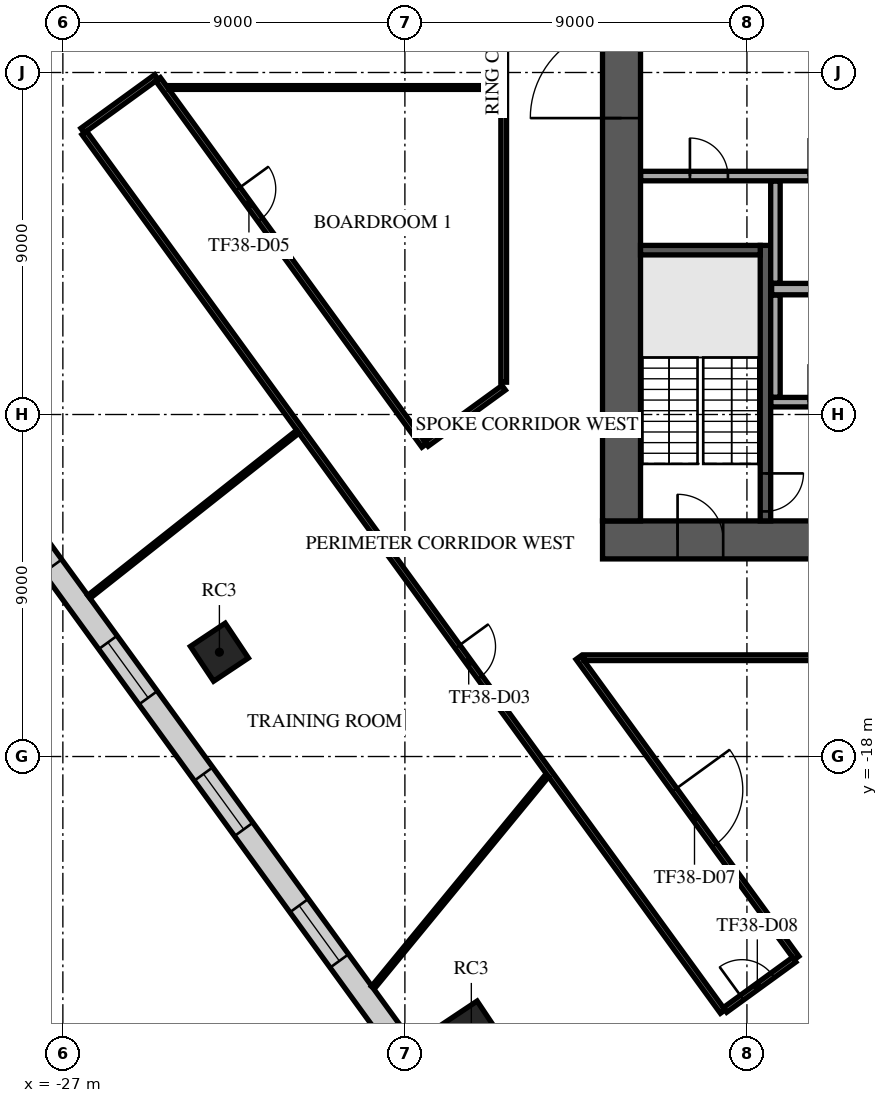
"""IFC4 building model, lengths in metres.
Left out: names, types, materials, properties, quantities, classifications, styles, units other than length and angle.
Written with IfcOpenShell. Run it as: python <this file> out.ifc"""

import sys

from ifc_helpers import new_model, si_unit, direction, frame, frame_2d, origin, origin_2d, place, context, subcontext, project, spatial, rectangle, extrude, element, fill, save


model = new_model("IFC4")
c1 = context("Model", 3, precision=1e-05, world=origin(), true_north=direction((0.0, 1.0)))
c2 = subcontext(c1, "Body", "Model", "MODEL_VIEW")
j1 = project(units=[si_unit("LENGTHUNIT", "METRE"), si_unit("PLANEANGLEUNIT", "RADIAN")], contexts=[c1])
p1 = place(None, origin())
s1 = spatial("IfcSite", under=j1, at=p1, CompositionType="ELEMENT")
p2 = place(p1, origin())
s2 = spatial("IfcBuilding", under=s1, at=p2, CompositionType="ELEMENT")
p3 = place(p2, frame((0.0, 0.0, 163.7)))
s3 = spatial("IfcBuildingStorey", under=s2, at=p3, CompositionType="ELEMENT", Elevation=163.7)
for number, where, z_axis, x_axis in (
    (1, (-22.881, -15.255, 0.0), (0.0, 0.0, 1.0), (0.832, 0.555, 0.0)),
    (2, (-16.252, -25.198, 0.0), (0.0, 0.0, 1.0), (0.832, 0.555, 0.0)),
):
    element("IfcColumn", number, at=place(p3, frame(where, z_axis=z_axis, x_axis=x_axis)), inside=s3, PredefinedType="COLUMN", context=c2, shape_type="SweptSolid", body=[
        extrude(rectangle(XDim=1.1, YDim=1.1, at=origin_2d()), origin(), (0.0, 0.0, 1.0), 4.0),
    ])
p4 = place(p3, frame((-12.8, -12.3, 0.0), z_axis=(0.0, 0.0, 1.0), x_axis=(1.0, 0.0, 0.0)))
e3 = element("IfcWall", 3, at=p4, inside=s3, PredefinedType="SHEAR", context=c2, shape_type="SweptSolid", body=[
    extrude(rectangle(XDim=25.6, YDim=1.0, at=frame_2d((12.8, 0.0))), origin(), (0.0, 0.0, 1.0), 3.6),
])
p5 = place(p4, frame((7.7, 0.0, 0.0)))
e4 = element("IfcOpeningElement", 4, at=p5, cuts=e3, PredefinedType="OPENING", context=c2, shape_type="SweptSolid", body=[
    extrude(rectangle(XDim=2.0, YDim=2.1, at=frame_2d((1.0, 1.05))), frame((0.0, 0.51, 0.0), z_axis=(0.0, -1.0, 0.0), x_axis=(1.0, 0.0, 0.0)), (0.0, 0.0, 1.0), 1.02),
])
p6 = place(p4, frame((17.825, 0.0, 0.0)))
e5 = element("IfcOpeningElement", 5, at=p6, cuts=e3, PredefinedType="OPENING", context=c2, shape_type="SweptSolid", body=[
    extrude(rectangle(XDim=1.2, YDim=2.1, at=frame_2d((0.6, 1.05))), frame((0.0, 0.51, 0.0), z_axis=(0.0, -1.0, 0.0), x_axis=(1.0, 0.0, 0.0)), (0.0, 0.0, 1.0), 1.02),
])
p7 = place(p4, frame((1.975, 0.0, 0.0)))
e6 = element("IfcOpeningElement", 6, at=p7, cuts=e3, PredefinedType="OPENING", context=c2, shape_type="SweptSolid", body=[
    extrude(rectangle(XDim=1.2, YDim=2.1, at=frame_2d((0.6, 1.05))), frame((0.0, 0.51, 0.0), z_axis=(0.0, -1.0, 0.0), x_axis=(1.0, 0.0, 0.0)), (0.0, 0.0, 1.0), 1.02),
])
p8 = place(p4, frame((22.425, 0.0, 0.0)))
e7 = element("IfcOpeningElement", 7, at=p8, cuts=e3, PredefinedType="OPENING", context=c2, shape_type="SweptSolid", body=[
    extrude(rectangle(XDim=1.2, YDim=2.1, at=frame_2d((0.6, 1.05))), frame((0.0, 0.51, 0.0), z_axis=(0.0, -1.0, 0.0), x_axis=(1.0, 0.0, 0.0)), (0.0, 0.0, 1.0), 1.02),
])
p9 = place(p3, frame((-12.3, -11.8, 0.0), z_axis=(0.0, 0.0, 1.0), x_axis=(0.0, 1.0, 0.0)))
e8 = element("IfcWall", 8, at=p9, inside=s3, PredefinedType="SHEAR", context=c2, shape_type="SweptSolid", body=[
    extrude(rectangle(XDim=23.6, YDim=1.0, at=frame_2d((11.8, 0.0))), origin(), (0.0, 0.0, 1.0), 3.6),
])
p10 = place(p9, frame((10.6, 0.0, 0.0)))
e9 = element("IfcOpeningElement", 9, at=p10, cuts=e8, PredefinedType="OPENING", context=c2, shape_type="SweptSolid", body=[
    extrude(rectangle(XDim=2.4, YDim=2.4, at=frame_2d((1.2, 1.2))), frame((0.0, 0.51, 0.0), z_axis=(0.0, -1.0, 0.0), x_axis=(1.0, 0.0, 0.0)), (0.0, 0.0, 1.0), 1.02),
])
p11 = place(p3, frame((-8.512, -4.55, 0.0), z_axis=(0.0, 0.0, 1.0), x_axis=(0.0, -1.0, 0.0)))
e10 = element("IfcWall", 10, at=p11, inside=s3, PredefinedType="SOLIDWALL", context=c2, shape_type="SweptSolid", body=[
    extrude(rectangle(XDim=7.25, YDim=0.275, at=frame_2d((3.625, 0.0))), origin(), (0.0, 0.0, 1.0), 3.6),
])
p12 = place(p11, frame((6.0, 0.0, 0.0)))
e11 = element("IfcOpeningElement", 11, at=p12, cuts=e10, PredefinedType="OPENING", context=c2, shape_type="SweptSolid", body=[
    extrude(rectangle(XDim=1.0, YDim=2.1, at=frame_2d((0.5, 1.05))), frame((0.0, 0.147, 0.0), z_axis=(0.0, -1.0, 0.0), x_axis=(1.0, 0.0, 0.0)), (0.0, 0.0, 1.0), 0.295),
])
p13 = place(p3, frame((-8.65, -4.675, 0.0), z_axis=(0.0, 0.0, 1.0), x_axis=(-1.0, 0.0, 0.0)))
e12 = element("IfcWall", 12, at=p13, inside=s3, PredefinedType="SOLIDWALL", context=c2, shape_type="SweptSolid", body=[
    extrude(rectangle(XDim=3.15, YDim=0.25, at=frame_2d((1.575, 0.0))), origin(), (0.0, 0.0, 1.0), 3.6),
])
p14 = place(p3, frame((-8.37, -8.675, 0.0), z_axis=(0.0, 0.0, 1.0), x_axis=(1.0, 0.0, 0.0)))
e13 = element("IfcWall", 13, at=p14, inside=s3, PredefinedType="PARTITIONING", context=c2, shape_type="SweptSolid", body=[
    extrude(rectangle(XDim=5.49, YDim=0.25, at=frame_2d((2.745, 0.0))), origin(), (0.0, 0.0, 1.0), 3.6),
])
p15 = place(p14, frame((0.995, 0.0, 0.0)))
e14 = element("IfcOpeningElement", 14, at=p15, cuts=e13, PredefinedType="OPENING", context=c2, shape_type="SweptSolid", body=[
    extrude(rectangle(XDim=1.0, YDim=2.1, at=frame_2d((0.5, 1.05))), frame((0.0, 0.135, 0.0), z_axis=(0.0, -1.0, 0.0), x_axis=(1.0, 0.0, 0.0)), (0.0, 0.0, 1.0), 0.27),
])
p16 = place(p14, frame((3.745, 0.0, 0.0)))
e15 = element("IfcOpeningElement", 15, at=p16, cuts=e13, PredefinedType="OPENING", context=c2, shape_type="SweptSolid", body=[
    extrude(rectangle(XDim=1.0, YDim=2.1, at=frame_2d((0.5, 1.05))), frame((0.0, 0.135, 0.0), z_axis=(0.0, -1.0, 0.0), x_axis=(1.0, 0.0, 0.0)), (0.0, 0.0, 1.0), 0.27),
])
p17 = place(p3, frame((-8.25, -8.545, 0.0), z_axis=(0.0, 0.0, 1.0), x_axis=(0.0, 1.0, 0.0)))
e16 = element("IfcWall", 16, at=p17, inside=s3, PredefinedType="PARTITIONING", context=c2, shape_type="SweptSolid", body=[
    extrude(rectangle(XDim=2.69, YDim=0.25, at=frame_2d((1.345, 0.0))), origin(), (0.0, 0.0, 1.0), 3.6),
])
p18 = place(p3, frame((-8.35, -5.7, 0.0), z_axis=(0.0, 0.0, 1.0), x_axis=(1.0, 0.0, 0.0)))
e17 = element("IfcWall", 17, at=p18, inside=s3, PredefinedType="PARTITIONING", context=c2, shape_type="SweptSolid", body=[
    extrude(rectangle(XDim=5.47, YDim=0.3, at=frame_2d((2.735, 0.0))), origin(), (0.0, 0.0, 1.0), 3.6),
])
p19 = place(p3, frame((-8.25, -5.545, 0.0), z_axis=(0.0, 0.0, 1.0), x_axis=(0.0, 1.0, 0.0)))
e18 = element("IfcWall", 18, at=p19, inside=s3, PredefinedType="PARTITIONING", context=c2, shape_type="SweptSolid", body=[
    extrude(rectangle(XDim=2.69, YDim=0.25, at=frame_2d((1.345, 0.0))), origin(), (0.0, 0.0, 1.0), 3.6),
])
p20 = place(p3, frame((-11.795, -2.725, 0.0), z_axis=(0.0, 0.0, 1.0), x_axis=(1.0, 0.0, 0.0)))
e19 = element("IfcWall", 19, at=p20, inside=s3, PredefinedType="PARTITIONING", context=c2, shape_type="SweptSolid", body=[
    extrude(rectangle(XDim=8.915, YDim=0.25, at=frame_2d((4.458, 0.0))), origin(), (0.0, 0.0, 1.0), 3.6),
])
p21 = place(p20, frame((1.295, 0.0, 0.0)))
e20 = element("IfcOpeningElement", 20, at=p21, cuts=e19, PredefinedType="OPENING", context=c2, shape_type="SweptSolid", body=[
    extrude(rectangle(XDim=1.0, YDim=2.1, at=frame_2d((0.5, 1.05))), frame((0.0, 0.135, 0.0), z_axis=(0.0, -1.0, 0.0), x_axis=(1.0, 0.0, 0.0)), (0.0, 0.0, 1.0), 0.27),
])
p22 = place(p20, frame((4.42, 0.0, 0.0)))
e21 = element("IfcOpeningElement", 21, at=p22, cuts=e19, PredefinedType="OPENING", context=c2, shape_type="SweptSolid", body=[
    extrude(rectangle(XDim=1.0, YDim=2.1, at=frame_2d((0.5, 1.05))), frame((0.0, 0.135, 0.0), z_axis=(0.0, -1.0, 0.0), x_axis=(1.0, 0.0, 0.0)), (0.0, 0.0, 1.0), 0.27),
])
p23 = place(p3, frame((-36.533, -0.245, 0.0), z_axis=(0.0, 0.0, 1.0), x_axis=(0.587787495615, -0.809015364501, 0.0)))
e22 = element("IfcWall", 22, at=p23, inside=s3, PredefinedType="STANDARD", context=c2, shape_type="SweptSolid", body=[
    extrude(rectangle(XDim=42.552, YDim=0.6, at=frame_2d((21.276, 0.0))), origin(), (0.0, 0.0, 1.0), 3.6),
])
p24 = place(p23, frame((1.178, 0.0, 0.9)))
e23 = element("IfcOpeningElement", 23, at=p24, cuts=e22, PredefinedType="OPENING", context=c2, shape_type="SweptSolid", body=[
    extrude(rectangle(XDim=1.8, YDim=2.1, at=frame_2d((0.9, 1.05))), frame((0.0, 0.31, 0.0), z_axis=(0.0, -1.0, 0.0), x_axis=(1.0, 0.0, 0.0)), (0.0, 0.0, 1.0), 0.62),
])
p25 = place(p23, frame((5.396, 0.0, 0.9)))
e24 = element("IfcOpeningElement", 24, at=p25, cuts=e22, PredefinedType="OPENING", context=c2, shape_type="SweptSolid", body=[
    extrude(rectangle(XDim=1.8, YDim=2.1, at=frame_2d((0.9, 1.05))), frame((0.0, 0.31, 0.0), z_axis=(0.0, -1.0, 0.0), x_axis=(1.0, 0.0, 0.0)), (0.0, 0.0, 1.0), 0.62),
])
p26 = place(p23, frame((9.676, 0.0, 0.9)))
e25 = element("IfcOpeningElement", 25, at=p26, cuts=e22, PredefinedType="OPENING", context=c2, shape_type="SweptSolid", body=[
    extrude(rectangle(XDim=1.8, YDim=2.1, at=frame_2d((0.9, 1.05))), frame((0.0, 0.31, 0.0), z_axis=(0.0, -1.0, 0.0), x_axis=(1.0, 0.0, 0.0)), (0.0, 0.0, 1.0), 0.62),
])
p27 = place(p23, frame((13.956, 0.0, 0.9)))
e26 = element("IfcOpeningElement", 26, at=p27, cuts=e22, PredefinedType="OPENING", context=c2, shape_type="SweptSolid", body=[
    extrude(rectangle(XDim=1.8, YDim=2.1, at=frame_2d((0.9, 1.05))), frame((0.0, 0.31, 0.0), z_axis=(0.0, -1.0, 0.0), x_axis=(1.0, 0.0, 0.0)), (0.0, 0.0, 1.0), 0.62),
])
p28 = place(p23, frame((18.236, 0.0, 0.9)))
e27 = element("IfcOpeningElement", 27, at=p28, cuts=e22, PredefinedType="OPENING", context=c2, shape_type="SweptSolid", body=[
    extrude(rectangle(XDim=1.8, YDim=2.1, at=frame_2d((0.9, 1.05))), frame((0.0, 0.31, 0.0), z_axis=(0.0, -1.0, 0.0), x_axis=(1.0, 0.0, 0.0)), (0.0, 0.0, 1.0), 0.62),
])
p29 = place(p23, frame((22.516, 0.0, 0.9)))
e28 = element("IfcOpeningElement", 28, at=p29, cuts=e22, PredefinedType="OPENING", context=c2, shape_type="SweptSolid", body=[
    extrude(rectangle(XDim=1.8, YDim=2.1, at=frame_2d((0.9, 1.05))), frame((0.0, 0.31, 0.0), z_axis=(0.0, -1.0, 0.0), x_axis=(1.0, 0.0, 0.0)), (0.0, 0.0, 1.0), 0.62),
])
p30 = place(p23, frame((26.796, 0.0, 0.9)))
e29 = element("IfcOpeningElement", 29, at=p30, cuts=e22, PredefinedType="OPENING", context=c2, shape_type="SweptSolid", body=[
    extrude(rectangle(XDim=1.8, YDim=2.1, at=frame_2d((0.9, 1.05))), frame((0.0, 0.31, 0.0), z_axis=(0.0, -1.0, 0.0), x_axis=(1.0, 0.0, 0.0)), (0.0, 0.0, 1.0), 0.62),
])
p31 = place(p23, frame((31.076, 0.0, 0.9)))
e30 = element("IfcOpeningElement", 30, at=p31, cuts=e22, PredefinedType="OPENING", context=c2, shape_type="SweptSolid", body=[
    extrude(rectangle(XDim=1.8, YDim=2.1, at=frame_2d((0.9, 1.05))), frame((0.0, 0.31, 0.0), z_axis=(0.0, -1.0, 0.0), x_axis=(1.0, 0.0, 0.0)), (0.0, 0.0, 1.0), 0.62),
])
p32 = place(p23, frame((35.356, 0.0, 0.9)))
e31 = element("IfcOpeningElement", 31, at=p32, cuts=e22, PredefinedType="OPENING", context=c2, shape_type="SweptSolid", body=[
    extrude(rectangle(XDim=1.8, YDim=2.1, at=frame_2d((0.9, 1.05))), frame((0.0, 0.31, 0.0), z_axis=(0.0, -1.0, 0.0), x_axis=(1.0, 0.0, 0.0)), (0.0, 0.0, 1.0), 0.62),
])
p33 = place(p23, frame((39.573, 0.0, 0.9)))
e32 = element("IfcOpeningElement", 32, at=p33, cuts=e22, PredefinedType="OPENING", context=c2, shape_type="SweptSolid", body=[
    extrude(rectangle(XDim=1.8, YDim=2.1, at=frame_2d((0.9, 1.05))), frame((0.0, 0.31, 0.0), z_axis=(0.0, -1.0, 0.0), x_axis=(1.0, 0.0, 0.0)), (0.0, 0.0, 1.0), 0.62),
])
p34 = place(p3, frame((-26.481, -1.528, 0.0), z_axis=(0.0, 0.0, 1.0), x_axis=(0.809158191643, 0.587590861822, 0.0)))
e33 = element("IfcWall", 33, at=p34, inside=s3, PredefinedType="PARTITIONING", context=c2, shape_type="SweptSolid", body=[
    extrude(rectangle(XDim=2.4, YDim=0.15, at=frame_2d((1.2, 0.0))), origin(), (0.0, 0.0, 1.0), 3.15),
])
p35 = place(p3, frame((-26.437, -1.589, 0.0), z_axis=(0.0, 0.0, 1.0), x_axis=(0.587768879666, -0.809028889531, 0.0)))
e34 = element("IfcWall", 34, at=p35, inside=s3, PredefinedType="PARTITIONING", context=c2, shape_type="SweptSolid", body=[
    extrude(rectangle(XDim=28.583, YDim=0.15, at=frame_2d((14.292, 0.0))), origin(), (0.0, 0.0, 1.0), 3.15),
])
p36 = place(p35, frame((16.711, 0.0, 0.0)))
e35 = element("IfcOpeningElement", 35, at=p36, cuts=e34, PredefinedType="OPENING", context=c2, shape_type="SweptSolid", body=[
    extrude(rectangle(XDim=1.0, YDim=2.1, at=frame_2d((0.5, 1.05))), frame((0.0, 0.085, 0.0), z_axis=(0.0, -1.0, 0.0), x_axis=(1.0, 0.0, 0.0)), (0.0, 0.0, 1.0), 0.17),
])
p37 = place(p3, frame((-24.495, -0.179, 0.0), z_axis=(0.0, 0.0, 1.0), x_axis=(0.587806096184, -0.809001849991, 0.0)))
e36 = element("IfcWall", 36, at=p37, inside=s3, PredefinedType="PARTITIONING", context=c2, shape_type="SweptSolid", body=[
    extrude(rectangle(XDim=11.914, YDim=0.15, at=frame_2d((5.957, 0.0))), origin(), (0.0, 0.0, 1.0), 3.15),
])
p38 = place(p37, frame((3.568, 0.0, 0.0)))
e37 = element("IfcOpeningElement", 37, at=p38, cuts=e36, PredefinedType="OPENING", context=c2, shape_type="SweptSolid", body=[
    extrude(rectangle(XDim=1.0, YDim=2.1, at=frame_2d((0.5, 1.05))), frame((0.0, 0.085, 0.0), z_axis=(0.0, -1.0, 0.0), x_axis=(1.0, 0.0, 0.0)), (0.0, 0.0, 1.0), 0.17),
])
p39 = place(p3, frame((-17.431, -9.773, 0.0), z_axis=(0.0, 0.0, 1.0), x_axis=(0.809042902641, 0.587749590971, 0.0)))
e38 = element("IfcWall", 38, at=p39, inside=s3, PredefinedType="PARTITIONING", context=c2, shape_type="SweptSolid", body=[
    extrude(rectangle(XDim=2.511, YDim=0.15, at=frame_2d((1.255, 0.0))), origin(), (0.0, 0.0, 1.0), 3.15),
])
p40 = place(p3, frame((-15.4, -8.15, 0.0), z_axis=(0.0, 0.0, 1.0), x_axis=(0.0, 1.0, 0.0)))
e39 = element("IfcWall", 39, at=p40, inside=s3, PredefinedType="PARTITIONING", context=c2, shape_type="SweptSolid", body=[
    extrude(rectangle(XDim=17.754, YDim=0.15, at=frame_2d((8.877, 0.0))), origin(), (0.0, 0.0, 1.0), 3.15),
])
p41 = place(p40, frame((13.304, 0.0, 0.0)))
e40 = element("IfcOpeningElement", 40, at=p41, cuts=e39, PredefinedType="OPENING", context=c2, shape_type="SweptSolid", body=[
    extrude(rectangle(XDim=1.8, YDim=2.1, at=frame_2d((0.9, 1.05))), frame((0.0, 0.085, 0.0), z_axis=(0.0, -1.0, 0.0), x_axis=(1.0, 0.0, 0.0)), (0.0, 0.0, 1.0), 0.17),
])
p42 = place(p3, frame((-13.436, -15.4, 0.0), z_axis=(0.0, 0.0, 1.0), x_axis=(0.58776885963, -0.809028904088, 0.0)))
e41 = element("IfcWall", 41, at=p42, inside=s3, PredefinedType="PARTITIONING", context=c2, shape_type="SweptSolid", body=[
    extrude(rectangle(XDim=9.767, YDim=0.15, at=frame_2d((4.884, 0.0))), origin(), (0.0, 0.0, 1.0), 3.15),
])
p43 = place(p42, frame((4.3, 0.0, 0.0)))
e42 = element("IfcOpeningElement", 42, at=p43, cuts=e41, PredefinedType="OPENING", context=c2, shape_type="SweptSolid", body=[
    extrude(rectangle(XDim=1.8, YDim=2.1, at=frame_2d((0.9, 1.05))), frame((0.0, 0.085, 0.0), z_axis=(0.0, -1.0, 0.0), x_axis=(1.0, 0.0, 0.0)), (0.0, 0.0, 1.0), 0.17),
])
p44 = place(p3, frame((-13.289, -15.4, 0.0), z_axis=(0.0, 0.0, 1.0), x_axis=(1.0, 0.0, 0.0)))
e43 = element("IfcWall", 43, at=p44, inside=s3, PredefinedType="PARTITIONING", context=c2, shape_type="SweptSolid", body=[
    extrude(rectangle(XDim=20.48, YDim=0.15, at=frame_2d((10.24, 0.0))), origin(), (0.0, 0.0, 1.0), 3.15),
])
p45 = place(p44, frame((15.041, 0.0, 0.0)))
e44 = element("IfcOpeningElement", 44, at=p45, cuts=e43, PredefinedType="OPENING", context=c2, shape_type="SweptSolid", body=[
    extrude(rectangle(XDim=1.0, YDim=2.1, at=frame_2d((0.5, 1.05))), frame((0.0, 0.085, 0.0), z_axis=(0.0, -1.0, 0.0), x_axis=(1.0, 0.0, 0.0)), (0.0, 0.0, 1.0), 0.17),
])
p46 = place(p3, frame((-9.576, -24.669, 0.0), z_axis=(0.0, 0.0, 1.0), x_axis=(0.809045580708, 0.587745904569, 0.0)))
e45 = element("IfcWall", 45, at=p46, inside=s3, PredefinedType="PARTITIONING", context=c2, shape_type="SweptSolid", body=[
    extrude(rectangle(XDim=2.25, YDim=0.15, at=frame_2d((1.125, 0.0))), origin(), (0.0, 0.0, 1.0), 3.15),
])
p47 = place(p46, frame((0.55, 0.0, 0.0)))
e46 = element("IfcOpeningElement", 46, at=p47, cuts=e45, PredefinedType="OPENING", context=c2, shape_type="SweptSolid", body=[
    extrude(rectangle(XDim=1.0, YDim=2.1, at=frame_2d((0.5, 1.05))), frame((0.0, 0.085, 0.0), z_axis=(0.0, -1.0, 0.0), x_axis=(1.0, 0.0, 0.0)), (0.0, 0.0, 1.0), 0.17),
])
p48 = place(p3, frame((-26.313, -13.797, 0.0), z_axis=(0.0, 0.0, 1.0), x_axis=(0.784436491328, 0.620209151072, 0.0)))
e47 = element("IfcWall", 47, at=p48, inside=s3, PredefinedType="PARTITIONING", context=c2, shape_type="SweptSolid", body=[
    extrude(rectangle(XDim=7.005, YDim=0.1, at=frame_2d((3.502, 0.0))), origin(), (0.0, 0.0, 1.0), 2.9),
])
p49 = place(p3, frame((-24.209, -0.395, 0.0), z_axis=(0.0, 0.0, 1.0), x_axis=(1.0, 0.0, 0.0)))
e48 = element("IfcWall", 48, at=p49, inside=s3, PredefinedType="PARTITIONING", context=c2, shape_type="SweptSolid", body=[
    extrude(rectangle(XDim=8.734, YDim=0.1, at=frame_2d((4.367, 0.0))), origin(), (0.0, 0.0, 1.0), 3.15),
])
p50 = place(p3, frame((-18.842, -24.081, 0.0), z_axis=(0.0, 0.0, 1.0), x_axis=(0.634911726152, 0.772584687911, 0.0)))
e49 = element("IfcWall", 49, at=p50, inside=s3, PredefinedType="PARTITIONING", context=c2, shape_type="SweptSolid", body=[
    extrude(rectangle(XDim=7.221, YDim=0.1, at=frame_2d((3.61, 0.0))), origin(), (0.0, 0.0, 1.0), 2.9),
])
p51 = place(p7, origin())
e50 = element("IfcDoor", 50, at=p51, inside=s3, OperationType="SINGLE_SWING_LEFT", PredefinedType="DOOR", context=c2, shape_type="SweptSolid", body=[
    extrude(rectangle(XDim=1.2, YDim=2.1, at=frame_2d((0.6, 1.05))), frame((0.0, 0.025, 0.0), z_axis=(0.0, -1.0, 0.0), x_axis=(1.0, 0.0, 0.0)), (0.0, 0.0, 1.0), 0.05),
])
fill(e6, e50)
p52 = place(p10, origin())
e51 = element("IfcDoor", 51, at=p52, inside=s3, OperationType="SINGLE_SWING_LEFT", PredefinedType="DOOR", context=c2, shape_type="SweptSolid", body=[
    extrude(rectangle(XDim=2.4, YDim=2.4, at=frame_2d((1.2, 1.2))), frame((0.0, 0.025, 0.0), z_axis=(0.0, -1.0, 0.0), x_axis=(1.0, 0.0, 0.0)), (0.0, 0.0, 1.0), 0.05),
])
fill(e9, e51)
p53 = place(p12, origin())
e52 = element("IfcDoor", 52, at=p53, inside=s3, OperationType="SINGLE_SWING_LEFT", PredefinedType="DOOR", context=c2, shape_type="SweptSolid", body=[
    extrude(rectangle(XDim=1.0, YDim=2.1, at=frame_2d((0.5, 1.05))), frame((0.0, 0.025, 0.0), z_axis=(0.0, -1.0, 0.0), x_axis=(1.0, 0.0, 0.0)), (0.0, 0.0, 1.0), 0.05),
])
fill(e11, e52)
p54 = place(p21, origin())
e53 = element("IfcDoor", 53, at=p54, inside=s3, OperationType="SINGLE_SWING_LEFT", PredefinedType="DOOR", context=c2, shape_type="SweptSolid", body=[
    extrude(rectangle(XDim=1.0, YDim=2.1, at=frame_2d((0.5, 1.05))), frame((0.0, 0.025, 0.0), z_axis=(0.0, -1.0, 0.0), x_axis=(1.0, 0.0, 0.0)), (0.0, 0.0, 1.0), 0.05),
])
fill(e20, e53)
p55 = place(p27, origin())
e54 = element("IfcWindow", 54, at=p55, inside=s3, PartitioningType="SINGLE_PANEL", PredefinedType="WINDOW", context=c2, shape_type="SweptSolid", body=[
    extrude(rectangle(XDim=1.8, YDim=2.1, at=frame_2d((0.9, 1.05))), frame((0.0, 0.03, 0.0), z_axis=(0.0, -1.0, 0.0), x_axis=(1.0, 0.0, 0.0)), (0.0, 0.0, 1.0), 0.06),
])
fill(e26, e54)
p56 = place(p28, origin())
e55 = element("IfcWindow", 55, at=p56, inside=s3, PartitioningType="SINGLE_PANEL", PredefinedType="WINDOW", context=c2, shape_type="SweptSolid", body=[
    extrude(rectangle(XDim=1.8, YDim=2.1, at=frame_2d((0.9, 1.05))), frame((0.0, 0.03, 0.0), z_axis=(0.0, -1.0, 0.0), x_axis=(1.0, 0.0, 0.0)), (0.0, 0.0, 1.0), 0.06),
])
fill(e27, e55)
p57 = place(p29, origin())
e56 = element("IfcWindow", 56, at=p57, inside=s3, PartitioningType="SINGLE_PANEL", PredefinedType="WINDOW", context=c2, shape_type="SweptSolid", body=[
    extrude(rectangle(XDim=1.8, YDim=2.1, at=frame_2d((0.9, 1.05))), frame((0.0, 0.03, 0.0), z_axis=(0.0, -1.0, 0.0), x_axis=(1.0, 0.0, 0.0)), (0.0, 0.0, 1.0), 0.06),
])
fill(e28, e56)
p58 = place(p30, origin())
e57 = element("IfcWindow", 57, at=p58, inside=s3, PartitioningType="SINGLE_PANEL", PredefinedType="WINDOW", context=c2, shape_type="SweptSolid", body=[
    extrude(rectangle(XDim=1.8, YDim=2.1, at=frame_2d((0.9, 1.05))), frame((0.0, 0.03, 0.0), z_axis=(0.0, -1.0, 0.0), x_axis=(1.0, 0.0, 0.0)), (0.0, 0.0, 1.0), 0.06),
])
fill(e29, e57)
p59 = place(p36, frame((1.0, 0.0, 0.0), z_axis=(0.0, 0.0, 1.0), x_axis=(-1.0, 0.0, 0.0)))
e58 = element("IfcDoor", 58, at=p59, inside=s3, OperationType="SINGLE_SWING_LEFT", PredefinedType="DOOR", context=c2, shape_type="SweptSolid", body=[
    extrude(rectangle(XDim=1.0, YDim=2.1, at=frame_2d((0.5, 1.05))), frame((0.0, 0.025, 0.0), z_axis=(0.0, -1.0, 0.0), x_axis=(1.0, 0.0, 0.0)), (0.0, 0.0, 1.0), 0.05),
])
fill(e35, e58)
p60 = place(p38, origin())
e59 = element("IfcDoor", 59, at=p60, inside=s3, OperationType="SINGLE_SWING_RIGHT", PredefinedType="DOOR", context=c2, shape_type="SweptSolid", body=[
    extrude(rectangle(XDim=1.0, YDim=2.1, at=frame_2d((0.5, 1.05))), frame((0.0, 0.025, 0.0), z_axis=(0.0, -1.0, 0.0), x_axis=(1.0, 0.0, 0.0)), (0.0, 0.0, 1.0), 0.05),
])
fill(e37, e59)
p61 = place(p43, origin())
e60 = element("IfcDoor", 60, at=p61, inside=s3, OperationType="DOUBLE_DOOR_SINGLE_SWING", PredefinedType="DOOR", context=c2, shape_type="SweptSolid", body=[
    extrude(rectangle(XDim=1.8, YDim=2.1, at=frame_2d((0.9, 1.05))), frame((0.0, 0.025, 0.0), z_axis=(0.0, -1.0, 0.0), x_axis=(1.0, 0.0, 0.0)), (0.0, 0.0, 1.0), 0.05),
])
fill(e42, e60)
p62 = place(p47, frame((1.0, 0.0, 0.0), z_axis=(0.0, 0.0, 1.0), x_axis=(-1.0, 0.0, 0.0)))
e61 = element("IfcDoor", 61, at=p62, inside=s3, OperationType="SINGLE_SWING_LEFT", PredefinedType="DOOR", context=c2, shape_type="SweptSolid", body=[
    extrude(rectangle(XDim=1.0, YDim=2.1, at=frame_2d((0.5, 1.05))), frame((0.0, 0.025, 0.0), z_axis=(0.0, -1.0, 0.0), x_axis=(1.0, 0.0, 0.0)), (0.0, 0.0, 1.0), 0.05),
])
fill(e46, e61)
save(model, sys.argv[1])
